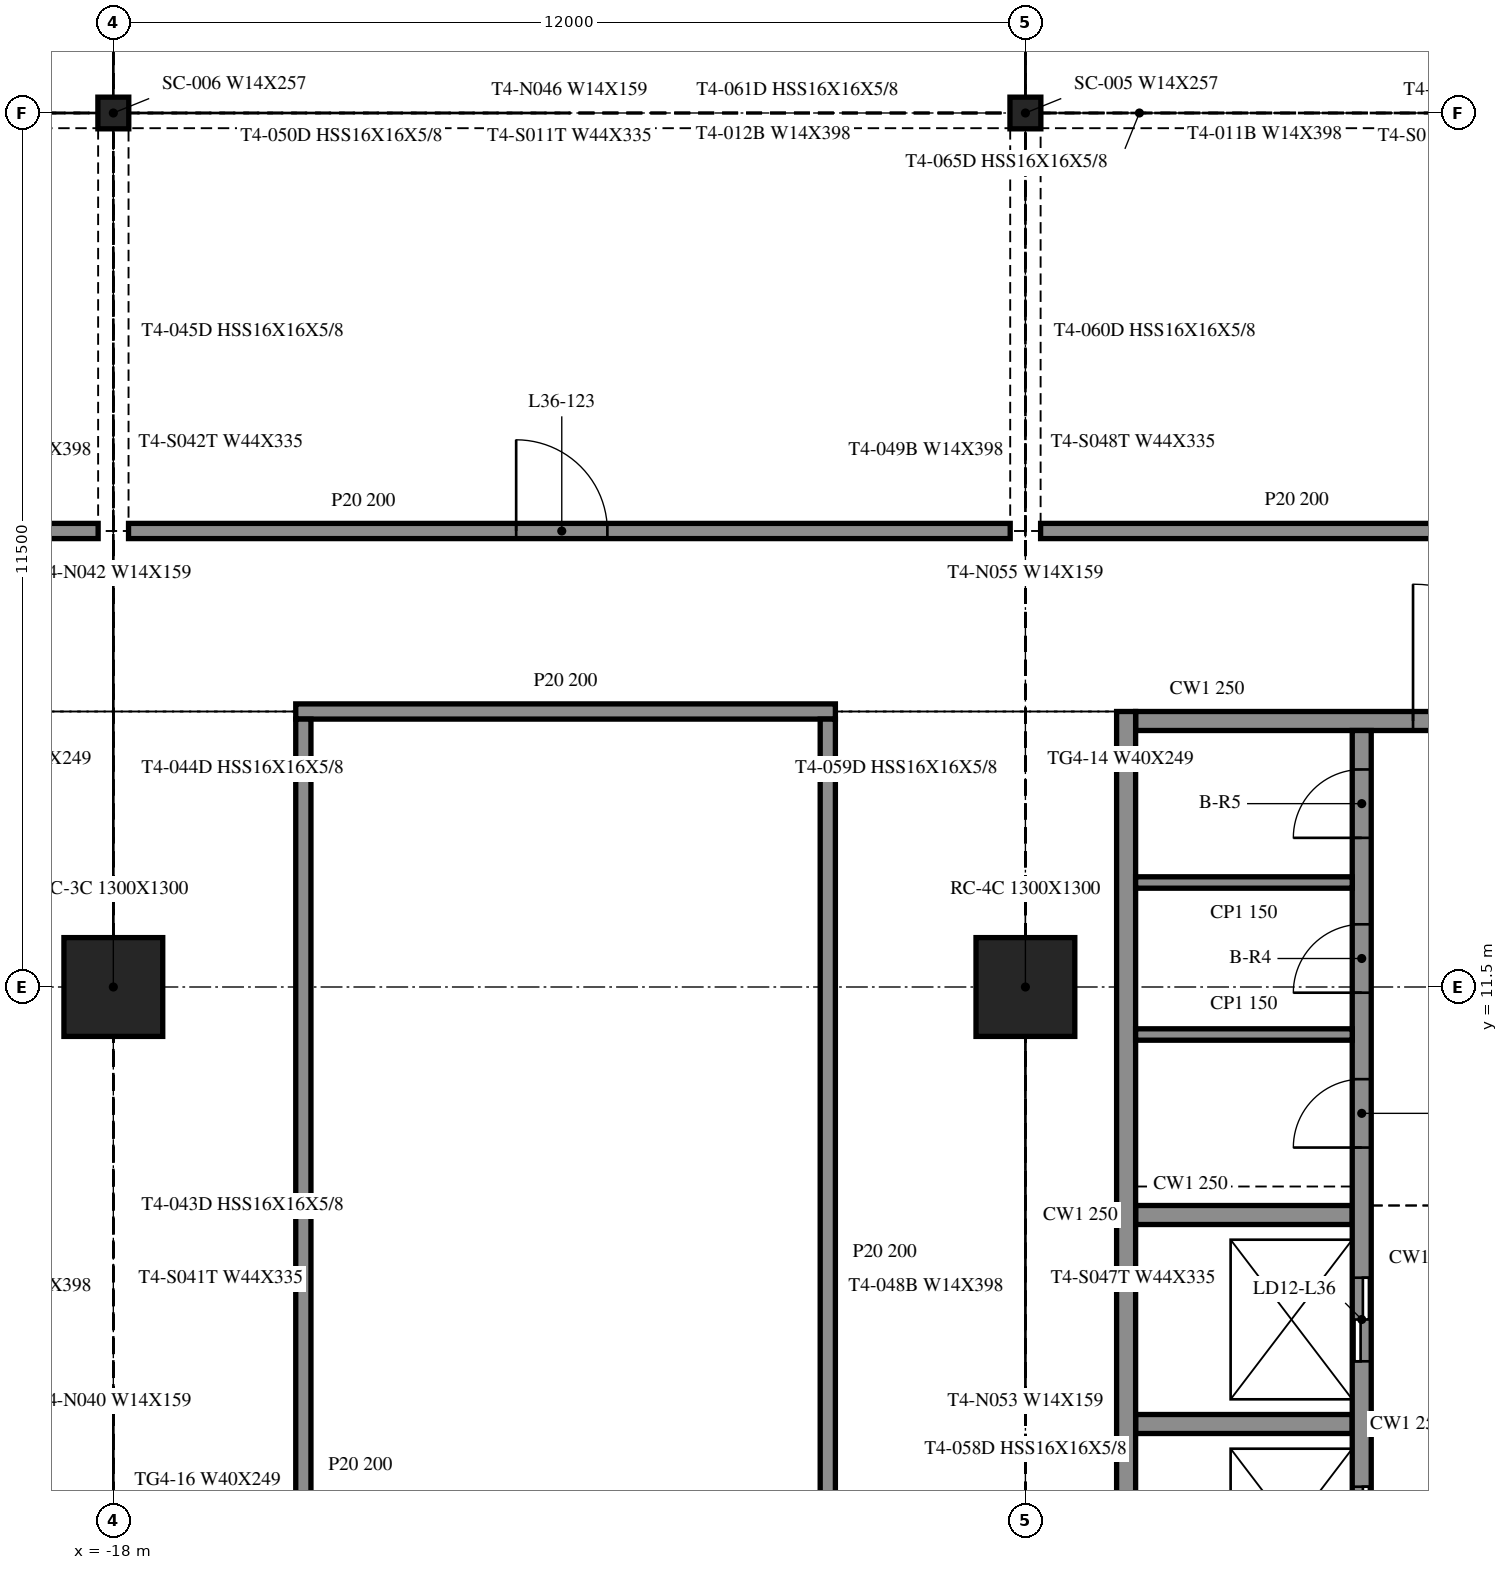
"""IFC4 building model, lengths in metres.
Left out: names, types, materials, properties, quantities, classifications, styles, units other than length and angle.
Written with IfcOpenShell. Run it as: python <this file> out.ifc"""

import sys

from ifc_helpers import new_model, si_unit, direction, frame, frame_2d, origin, origin_2d, place, context, subcontext, project, spatial, rectangle, i_section, extrude, element, fill, save


model = new_model("IFC4")
c1 = context("Model", 3, precision=1e-05, world=origin(), true_north=direction((0.0, 1.0)))
c2 = subcontext(c1, "Body", "Model", "MODEL_VIEW")
j1 = project(units=[si_unit("LENGTHUNIT", "METRE"), si_unit("PLANEANGLEUNIT", "RADIAN")], contexts=[c1])
p1 = place(None, origin())
s1 = spatial("IfcSite", under=j1, at=p1, CompositionType="ELEMENT")
p2 = place(p1, origin())
s2 = spatial("IfcBuilding", under=s1, at=p2, CompositionType="ELEMENT")
p3 = place(p2, frame((0.0, 0.0, 154.8)))
s3 = spatial("IfcBuildingStorey", under=s2, at=p3, CompositionType="ELEMENT", Elevation=154.8)
for number, where, z_axis, x_axis in (
    (1, (-18.0, 11.5, -0.55), (0.0, 0.0, 1.0), (1.0, 0.0, 0.0)),
    (2, (-6.0, 11.5, -0.55), (0.0, 0.0, 1.0), (1.0, 0.0, 0.0)),
):
    element("IfcColumn", number, at=place(p3, frame(where, z_axis=z_axis, x_axis=x_axis)), inside=s3, PredefinedType="COLUMN", context=c2, shape_type="SweptSolid", body=[
        extrude(rectangle(XDim=1.3, YDim=1.3, at=origin_2d()), origin(), (0.0, 0.0, 1.0), 4.61),
    ])
for number, where, z_axis, x_axis in (
    (3, (-6.0, 23.0, -0.55), (0.0, 0.0, 1.0), (1.0, 0.0, 0.0)),
    (4, (-18.0, 23.0, -0.55), (0.0, 0.0, 1.0), (1.0, 0.0, 0.0)),
):
    element("IfcColumn", number, at=place(p3, frame(where, z_axis=z_axis, x_axis=x_axis)), inside=s3, PredefinedType="COLUMN", context=c2, shape_type="SweptSolid", body=[
        extrude(i_section(OverallWidth=0.406, OverallDepth=0.417, WebThickness=0.03, FlangeThickness=0.048, at=origin_2d()), origin(), (0.0, 0.0, 1.0), 4.61),
    ])
p4 = place(p3, frame((-4.675, 15.125, 0.0), z_axis=(0.0, 0.0, 1.0), x_axis=(0.0, -1.0, 0.0)))
e5 = element("IfcWall", 5, at=p4, inside=s3, PredefinedType="SOLIDWALL", context=c2, shape_type="SweptSolid", body=[
    extrude(rectangle(XDim=24.25, YDim=0.25, at=frame_2d((12.125, 0.0))), origin(), (0.0, 0.0, 1.0), 4.06),
])
p5 = place(p3, frame((-4.55, 15.0, 0.0), z_axis=(0.0, 0.0, 1.0), x_axis=(1.0, 0.0, 0.0)))
e6 = element("IfcWall", 6, at=p5, inside=s3, PredefinedType="SOLIDWALL", context=c2, shape_type="SweptSolid", body=[
    extrude(rectangle(XDim=9.1, YDim=0.25, at=frame_2d((4.55, 0.0))), origin(), (0.0, 0.0, 1.0), 4.06),
])
p6 = place(p5, frame((3.65, 0.0, 0.0)))
e7 = element("IfcOpeningElement", 7, at=p6, cuts=e6, PredefinedType="OPENING", context=c2, shape_type="SweptSolid", body=[
    extrude(rectangle(XDim=1.8, YDim=2.1, at=frame_2d((0.9, 1.05))), frame((0.0, 0.135, 0.0), z_axis=(0.0, -1.0, 0.0), x_axis=(1.0, 0.0, 0.0)), (0.0, 0.0, 1.0), 0.27),
])
p7 = place(p3, frame((-1.575, -8.875, 0.0), z_axis=(0.0, 0.0, 1.0), x_axis=(0.0, 1.0, 0.0)))
e8 = element("IfcWall", 8, at=p7, inside=s3, PredefinedType="SOLIDWALL", context=c2, shape_type="SweptSolid", body=[
    extrude(rectangle(XDim=23.75, YDim=0.25, at=frame_2d((11.875, 0.0))), origin(), (0.0, 0.0, 1.0), 4.06),
])
p8 = place(p7, frame((7.2, 0.0, 0.0)))
e9 = element("IfcOpeningElement", 9, at=p8, cuts=e8, PredefinedType="OPENING", context=c2, shape_type="SweptSolid", body=[
    extrude(rectangle(XDim=1.1, YDim=2.1, at=frame_2d((0.55, 1.05))), frame((0.0, 0.135, 0.0), z_axis=(0.0, -1.0, 0.0), x_axis=(1.0, 0.0, 0.0)), (0.0, 0.0, 1.0), 0.27),
])
p9 = place(p7, frame((9.95, 0.0, 0.0)))
e10 = element("IfcOpeningElement", 10, at=p9, cuts=e8, PredefinedType="OPENING", context=c2, shape_type="SweptSolid", body=[
    extrude(rectangle(XDim=1.1, YDim=2.1, at=frame_2d((0.55, 1.05))), frame((0.0, 0.135, 0.0), z_axis=(0.0, -1.0, 0.0), x_axis=(1.0, 0.0, 0.0)), (0.0, 0.0, 1.0), 0.27),
])
p10 = place(p7, frame((12.7, 0.0, 0.0)))
e11 = element("IfcOpeningElement", 11, at=p10, cuts=e8, PredefinedType="OPENING", context=c2, shape_type="SweptSolid", body=[
    extrude(rectangle(XDim=1.1, YDim=2.1, at=frame_2d((0.55, 1.05))), frame((0.0, 0.135, 0.0), z_axis=(0.0, -1.0, 0.0), x_axis=(1.0, 0.0, 0.0)), (0.0, 0.0, 1.0), 0.27),
])
p11 = place(p7, frame((15.45, 0.0, 0.0)))
e12 = element("IfcOpeningElement", 12, at=p11, cuts=e8, PredefinedType="OPENING", context=c2, shape_type="SweptSolid", body=[
    extrude(rectangle(XDim=1.1, YDim=2.1, at=frame_2d((0.55, 1.05))), frame((0.0, 0.135, 0.0), z_axis=(0.0, -1.0, 0.0), x_axis=(1.0, 0.0, 0.0)), (0.0, 0.0, 1.0), 0.27),
])
p12 = place(p7, frame((1.012, 0.0, 0.0)))
e13 = element("IfcOpeningElement", 13, at=p12, cuts=e8, PredefinedType="OPENING", context=c2, shape_type="SweptSolid", body=[
    extrude(rectangle(XDim=0.9, YDim=2.1, at=frame_2d((0.45, 1.05))), frame((0.0, 0.135, 0.0), z_axis=(0.0, -1.0, 0.0), x_axis=(1.0, 0.0, 0.0)), (0.0, 0.0, 1.0), 0.27),
])
p13 = place(p7, frame((4.087, 0.0, 0.0)))
e14 = element("IfcOpeningElement", 14, at=p13, cuts=e8, PredefinedType="OPENING", context=c2, shape_type="SweptSolid", body=[
    extrude(rectangle(XDim=0.9, YDim=2.1, at=frame_2d((0.45, 1.05))), frame((0.0, 0.135, 0.0), z_axis=(0.0, -1.0, 0.0), x_axis=(1.0, 0.0, 0.0)), (0.0, 0.0, 1.0), 0.27),
])
p14 = place(p7, frame((18.262, 0.0, 0.0)))
e15 = element("IfcOpeningElement", 15, at=p14, cuts=e8, PredefinedType="OPENING", context=c2, shape_type="SweptSolid", body=[
    extrude(rectangle(XDim=0.9, YDim=2.1, at=frame_2d((0.45, 1.05))), frame((0.0, 0.135, 0.0), z_axis=(0.0, -1.0, 0.0), x_axis=(1.0, 0.0, 0.0)), (0.0, 0.0, 1.0), 0.27),
])
p15 = place(p7, frame((20.3, 0.0, 0.0)))
e16 = element("IfcOpeningElement", 16, at=p15, cuts=e8, PredefinedType="OPENING", context=c2, shape_type="SweptSolid", body=[
    extrude(rectangle(XDim=0.9, YDim=2.1, at=frame_2d((0.45, 1.05))), frame((0.0, 0.135, 0.0), z_axis=(0.0, -1.0, 0.0), x_axis=(1.0, 0.0, 0.0)), (0.0, 0.0, 1.0), 0.27),
])
p16 = place(p7, frame((22.337, 0.0, 0.0)))
e17 = element("IfcOpeningElement", 17, at=p16, cuts=e8, PredefinedType="OPENING", context=c2, shape_type="SweptSolid", body=[
    extrude(rectangle(XDim=0.9, YDim=2.1, at=frame_2d((0.45, 1.05))), frame((0.0, 0.135, 0.0), z_axis=(0.0, -1.0, 0.0), x_axis=(1.0, 0.0, 0.0)), (0.0, 0.0, 1.0), 0.27),
])
for number, where, z_axis, x_axis in (
    (18, (-4.55, 5.75, 0.0), (0.0, 0.0, 1.0), (1.0, 0.0, 0.0)),
    (19, (-4.55, 8.5, 0.0), (0.0, 0.0, 1.0), (1.0, 0.0, 0.0)),
):
    element("IfcWall", number, at=place(p3, frame(where, z_axis=z_axis, x_axis=x_axis)), inside=s3, PredefinedType="SOLIDWALL", context=c2, shape_type="SweptSolid", body=[
        extrude(rectangle(XDim=2.85, YDim=0.25, at=frame_2d((1.425, 0.0))), origin(), (0.0, 0.0, 1.0), 4.06),
    ])
for number, where, z_axis, x_axis in (
    (20, (-4.55, 10.875, 0.0), (0.0, 0.0, 1.0), (1.0, 0.0, 0.0)),
    (21, (-4.55, 12.875, 0.0), (0.0, 0.0, 1.0), (1.0, 0.0, 0.0)),
):
    element("IfcWall", number, at=place(p3, frame(where, z_axis=z_axis, x_axis=x_axis)), inside=s3, PredefinedType="PARTITIONING", context=c2, shape_type="SweptSolid", body=[
        extrude(rectangle(XDim=2.85, YDim=0.15, at=frame_2d((1.425, 0.0))), origin(), (0.0, 0.0, 1.0), 4.06),
    ])
p17 = place(p3, frame((-15.6, 15.125, 0.0), z_axis=(0.0, 0.0, 1.0), x_axis=(1.0, 0.0, 0.0)))
e22 = element("IfcWall", 22, at=p17, inside=s3, PredefinedType="PARTITIONING", context=c2, shape_type="SweptSolid", body=[
    extrude(rectangle(XDim=7.1, YDim=0.2, at=frame_2d((3.55, 0.0))), origin(), (0.0, 0.0, 1.0), 4.06),
])
p18 = place(p3, frame((-29.8, 17.5, 0.0), z_axis=(0.0, 0.0, 1.0), x_axis=(1.0, 0.0, 0.0)))
e23 = element("IfcWall", 23, at=p18, inside=s3, PredefinedType="PARTITIONING", context=c2, shape_type="SweptSolid", body=[
    extrude(rectangle(XDim=11.6, YDim=0.2, at=frame_2d((5.8, 0.0))), origin(), (0.0, 0.0, 1.0), 4.06),
])
p19 = place(p18, frame((5.1, 0.0, 0.0)))
e24 = element("IfcOpeningElement", 24, at=p19, cuts=e23, PredefinedType="OPENING", context=c2, shape_type="SweptSolid", body=[
    extrude(rectangle(XDim=1.2, YDim=2.1, at=frame_2d((0.6, 1.05))), frame((0.0, 0.11, 0.0), z_axis=(0.0, -1.0, 0.0), x_axis=(1.0, 0.0, 0.0)), (0.0, 0.0, 1.0), 0.22),
])
p20 = place(p3, frame((-17.8, 17.5, 0.0), z_axis=(0.0, 0.0, 1.0), x_axis=(1.0, 0.0, 0.0)))
e25 = element("IfcWall", 25, at=p20, inside=s3, PredefinedType="PARTITIONING", context=c2, shape_type="SweptSolid", body=[
    extrude(rectangle(XDim=11.6, YDim=0.2, at=frame_2d((5.8, 0.0))), origin(), (0.0, 0.0, 1.0), 4.06),
])
p21 = place(p20, frame((5.1, 0.0, 0.0)))
e26 = element("IfcOpeningElement", 26, at=p21, cuts=e25, PredefinedType="OPENING", context=c2, shape_type="SweptSolid", body=[
    extrude(rectangle(XDim=1.2, YDim=2.1, at=frame_2d((0.6, 1.05))), frame((0.0, 0.11, 0.0), z_axis=(0.0, -1.0, 0.0), x_axis=(1.0, 0.0, 0.0)), (0.0, 0.0, 1.0), 0.22),
])
p22 = place(p3, frame((-5.8, 17.5, 0.0), z_axis=(0.0, 0.0, 1.0), x_axis=(1.0, 0.0, 0.0)))
e27 = element("IfcWall", 27, at=p22, inside=s3, PredefinedType="PARTITIONING", context=c2, shape_type="SweptSolid", body=[
    extrude(rectangle(XDim=11.6, YDim=0.2, at=frame_2d((5.8, 0.0))), origin(), (0.0, 0.0, 1.0), 4.06),
])
p23 = place(p22, frame((5.3, 0.0, 0.0)))
e28 = element("IfcOpeningElement", 28, at=p23, cuts=e27, PredefinedType="OPENING", context=c2, shape_type="SweptSolid", body=[
    extrude(rectangle(XDim=1.0, YDim=2.1, at=frame_2d((0.5, 1.05))), frame((0.0, 0.11, 0.0), z_axis=(0.0, -1.0, 0.0), x_axis=(1.0, 0.0, 0.0)), (0.0, 0.0, 1.0), 0.22),
])
p24 = place(p3, frame((-15.5, -9.025, 0.0), z_axis=(0.0, 0.0, 1.0), x_axis=(0.0, 1.0, 0.0)))
e29 = element("IfcWall", 29, at=p24, inside=s3, PredefinedType="PARTITIONING", context=c2, shape_type="SweptSolid", body=[
    extrude(rectangle(XDim=24.05, YDim=0.2, at=frame_2d((12.025, 0.0))), origin(), (0.0, 0.0, 1.0), 4.06),
])
p25 = place(p24, frame((9.05, 0.0, 0.0)))
e30 = element("IfcOpeningElement", 30, at=p25, cuts=e29, PredefinedType="OPENING", context=c2, shape_type="SweptSolid", body=[
    extrude(rectangle(XDim=1.8, YDim=2.1, at=frame_2d((0.9, 1.05))), frame((0.0, 0.11, 0.0), z_axis=(0.0, -1.0, 0.0), x_axis=(1.0, 0.0, 0.0)), (0.0, 0.0, 1.0), 0.22),
])
p26 = place(p3, frame((-8.6, -9.025, 0.0), z_axis=(0.0, 0.0, 1.0), x_axis=(0.0, 1.0, 0.0)))
e31 = element("IfcWall", 31, at=p26, inside=s3, PredefinedType="PARTITIONING", context=c2, shape_type="SweptSolid", body=[
    extrude(rectangle(XDim=24.05, YDim=0.2, at=frame_2d((12.025, 0.0))), origin(), (0.0, 0.0, 1.0), 4.06),
])
p27 = place(p6, origin())
e32 = element("IfcDoor", 32, at=p27, inside=s3, OperationType="DOUBLE_DOOR_SINGLE_SWING", PredefinedType="DOOR", context=c2, shape_type="SweptSolid", body=[
    extrude(rectangle(XDim=1.8, YDim=2.1, at=frame_2d((0.9, 1.05))), frame((0.0, 0.025, 0.0), z_axis=(0.0, -1.0, 0.0), x_axis=(1.0, 0.0, 0.0)), (0.0, 0.0, 1.0), 0.05),
])
fill(e7, e32)
p28 = place(p10, origin())
e33 = element("IfcDoor", 33, at=p28, inside=s3, OperationType="DOUBLE_DOOR_SLIDING", PredefinedType="DOOR", context=c2, shape_type="SweptSolid", body=[
    extrude(rectangle(XDim=1.1, YDim=2.1, at=frame_2d((0.55, 1.05))), frame((0.0, 0.025, 0.0), z_axis=(0.0, -1.0, 0.0), x_axis=(1.0, 0.0, 0.0)), (0.0, 0.0, 1.0), 0.05),
])
fill(e11, e33)
p29 = place(p11, origin())
e34 = element("IfcDoor", 34, at=p29, inside=s3, OperationType="DOUBLE_DOOR_SLIDING", PredefinedType="DOOR", context=c2, shape_type="SweptSolid", body=[
    extrude(rectangle(XDim=1.1, YDim=2.1, at=frame_2d((0.55, 1.05))), frame((0.0, 0.025, 0.0), z_axis=(0.0, -1.0, 0.0), x_axis=(1.0, 0.0, 0.0)), (0.0, 0.0, 1.0), 0.05),
])
fill(e12, e34)
p30 = place(p14, origin())
e35 = element("IfcDoor", 35, at=p30, inside=s3, OperationType="SINGLE_SWING_LEFT", PredefinedType="DOOR", context=c2, shape_type="SweptSolid", body=[
    extrude(rectangle(XDim=0.9, YDim=2.1, at=frame_2d((0.45, 1.05))), frame((0.0, 0.025, 0.0), z_axis=(0.0, -1.0, 0.0), x_axis=(1.0, 0.0, 0.0)), (0.0, 0.0, 1.0), 0.05),
])
fill(e15, e35)
p31 = place(p15, origin())
e36 = element("IfcDoor", 36, at=p31, inside=s3, OperationType="SINGLE_SWING_RIGHT", PredefinedType="DOOR", context=c2, shape_type="SweptSolid", body=[
    extrude(rectangle(XDim=0.9, YDim=2.1, at=frame_2d((0.45, 1.05))), frame((0.0, 0.025, 0.0), z_axis=(0.0, -1.0, 0.0), x_axis=(1.0, 0.0, 0.0)), (0.0, 0.0, 1.0), 0.05),
])
fill(e16, e36)
p32 = place(p16, origin())
e37 = element("IfcDoor", 37, at=p32, inside=s3, OperationType="SINGLE_SWING_LEFT", PredefinedType="DOOR", context=c2, shape_type="SweptSolid", body=[
    extrude(rectangle(XDim=0.9, YDim=2.1, at=frame_2d((0.45, 1.05))), frame((0.0, 0.025, 0.0), z_axis=(0.0, -1.0, 0.0), x_axis=(1.0, 0.0, 0.0)), (0.0, 0.0, 1.0), 0.05),
])
fill(e17, e37)
p33 = place(p21, origin())
e38 = element("IfcDoor", 38, at=p33, inside=s3, OperationType="SINGLE_SWING_LEFT", PredefinedType="DOOR", context=c2, shape_type="SweptSolid", body=[
    extrude(rectangle(XDim=1.2, YDim=2.1, at=frame_2d((0.6, 1.05))), frame((0.0, 0.025, 0.0), z_axis=(0.0, -1.0, 0.0), x_axis=(1.0, 0.0, 0.0)), (0.0, 0.0, 1.0), 0.05),
])
fill(e26, e38)
save(model, sys.argv[1])
